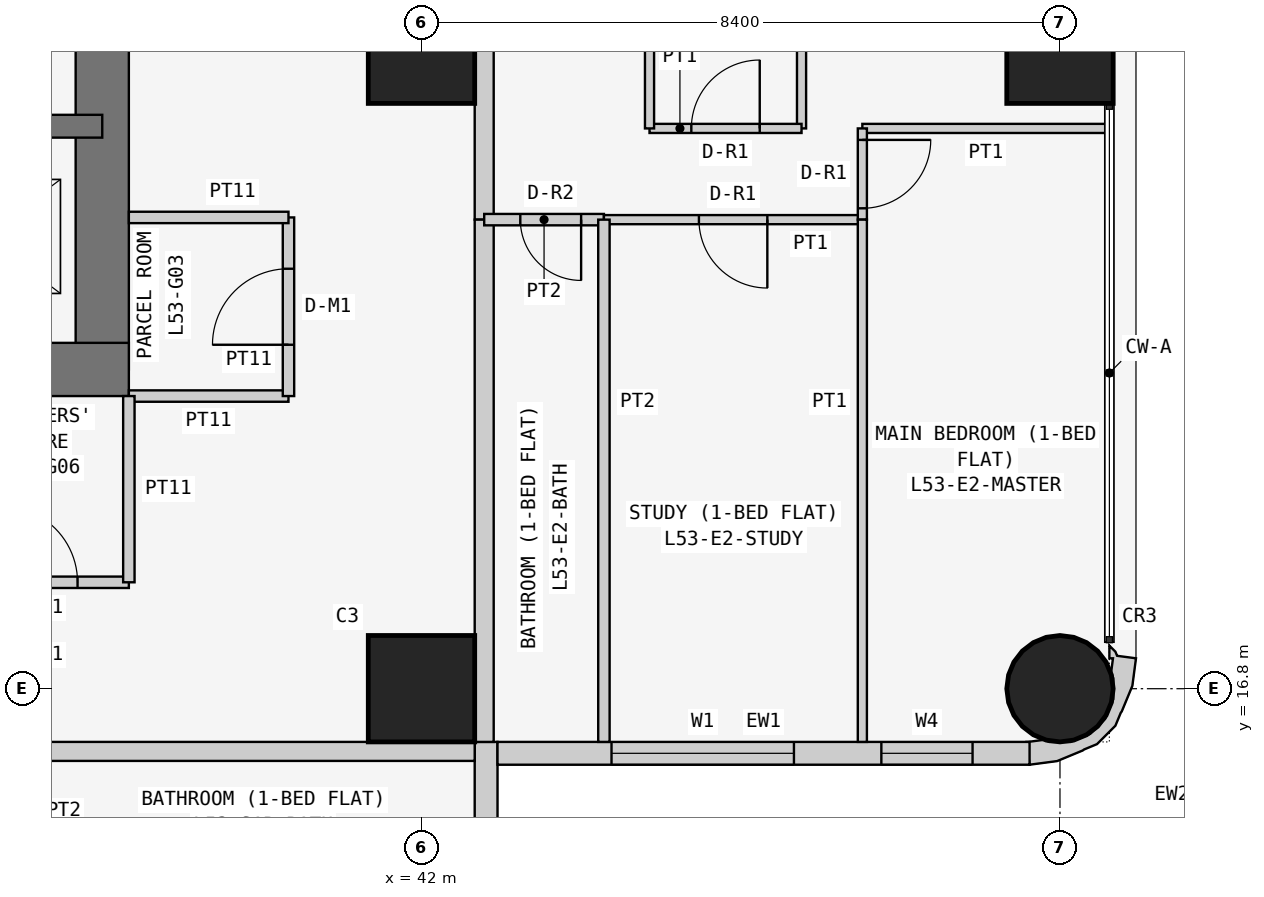
"""IFC4 building model, lengths in metres.
Left out: names, types, materials, properties, quantities, classifications, styles, units other than length and angle.
Written with IfcOpenShell. Run it as: python <this file> out.ifc"""

import sys

from ifc_helpers import new_model, si_unit, direction, frame, frame_2d, origin, origin_2d, place, context, subcontext, project, spatial, polyline, rectangle, circle, outline, extrude, element, fill, save


model = new_model("IFC4")
c1 = context("Model", 3, precision=1e-05, world=origin(), true_north=direction((0.0, 1.0)))
c2 = subcontext(c1, "Body", "Model", "MODEL_VIEW")
j1 = project(units=[si_unit("LENGTHUNIT", "METRE"), si_unit("PLANEANGLEUNIT", "RADIAN")], contexts=[c1])
p1 = place(None, origin())
s1 = spatial("IfcSite", under=j1, at=p1, CompositionType="ELEMENT")
p2 = place(p1, origin())
s2 = spatial("IfcBuilding", under=s1, at=p2, CompositionType="ELEMENT")
p3 = place(p2, frame((0.0, 0.0, 204.9)))
s3 = spatial("IfcBuildingStorey", under=s2, at=p3, CompositionType="ELEMENT", Elevation=204.9)
for number, where, z_axis, x_axis in (
    (1, (42.0, 16.8, 0.0), (0.0, 0.0, 1.0), (1.0, 0.0, 0.0)),
    (2, (42.0, 25.2, 0.0), (0.0, 0.0, 1.0), (1.0, 0.0, 0.0)),
):
    element("IfcColumn", number, at=place(p3, frame(where, z_axis=z_axis, x_axis=x_axis)), inside=s3, PredefinedType="COLUMN", context=c2, shape_type="SweptSolid", body=[
        extrude(rectangle(XDim=1.4, YDim=1.4, at=origin_2d()), origin(), (0.0, 0.0, 1.0), 3.6),
    ])
p4 = place(p3, frame((50.4, 16.8, 0.0), z_axis=(0.0, 0.0, 1.0), x_axis=(1.0, 0.0, 0.0)))
e3 = element("IfcColumn", 3, at=p4, inside=s3, PredefinedType="COLUMN", context=c2, shape_type="SweptSolid", body=[
    extrude(circle(Radius=0.7, at=origin_2d()), origin(), (0.0, 0.0, 1.0), 3.6),
])
p5 = place(p3, frame((50.4, 25.2, 0.0), z_axis=(0.0, 0.0, 1.0), x_axis=(1.0, 0.0, 0.0)))
e4 = element("IfcColumn", 4, at=p5, inside=s3, PredefinedType="COLUMN", context=c2, shape_type="SweptSolid", body=[
    extrude(rectangle(XDim=1.4, YDim=1.4, at=origin_2d()), origin(), (0.0, 0.0, 1.0), 3.6),
])
p6 = place(p3, frame((21.0, 21.0, 0.0), z_axis=(0.0, 0.0, 1.0), x_axis=(1.0, 0.0, 0.0)))
e5 = element("IfcWall", 5, at=p6, inside=s3, PredefinedType="SHEAR", context=c2, shape_type="SweptSolid", body=[
    extrude(rectangle(XDim=17.15, YDim=0.7, at=frame_2d((8.575, 0.0))), origin(), (0.0, 0.0, 1.0), 3.6),
])
p7 = place(p3, frame((37.8, 21.0, 0.0), z_axis=(0.0, 0.0, 1.0), x_axis=(0.0, 1.0, 0.0)))
e6 = element("IfcWall", 6, at=p7, inside=s3, PredefinedType="SHEAR", context=c2, shape_type="SweptSolid", body=[
    extrude(rectangle(XDim=17.15, YDim=0.7, at=frame_2d((8.575, 0.0))), origin(), (0.0, 0.0, 1.0), 3.6),
])
p8 = place(p7, frame((5.2, 0.0, 0.0)))
e7 = element("IfcOpeningElement", 7, at=p8, cuts=e6, PredefinedType="OPENING", context=c2, shape_type="SweptSolid", body=[
    extrude(rectangle(XDim=1.2, YDim=2.1, at=frame_2d((0.6, 1.05))), frame((0.0, 0.36, 0.0), z_axis=(0.0, -1.0, 0.0), x_axis=(1.0, 0.0, 0.0)), (0.0, 0.0, 1.0), 0.72),
])
p9 = place(p3, frame((26.6, 24.2, 0.0), z_axis=(0.0, 0.0, 1.0), x_axis=(1.0, 0.0, 0.0)))
e8 = element("IfcWall", 8, at=p9, inside=s3, PredefinedType="SHEAR", context=c2, shape_type="SweptSolid", body=[
    extrude(rectangle(XDim=11.2, YDim=0.3, at=frame_2d((5.6, 0.0))), origin(), (0.0, 0.0, 1.0), 3.6),
])
p10 = place(p9, frame((0.913, 0.0, 0.0)))
e9 = element("IfcOpeningElement", 9, at=p10, cuts=e8, PredefinedType="OPENING", context=c2, shape_type="SweptSolid", body=[
    extrude(rectangle(XDim=1.0, YDim=2.1, at=frame_2d((0.5, 1.05))), frame((0.0, 0.16, 0.0), z_axis=(0.0, -1.0, 0.0), x_axis=(1.0, 0.0, 0.0)), (0.0, 0.0, 1.0), 0.32),
])
p11 = place(p9, frame((3.75, 0.0, 0.0)))
e10 = element("IfcOpeningElement", 10, at=p11, cuts=e8, PredefinedType="OPENING", context=c2, shape_type="SweptSolid", body=[
    extrude(rectangle(XDim=0.9, YDim=2.1, at=frame_2d((0.45, 1.05))), frame((0.0, 0.16, 0.0), z_axis=(0.0, -1.0, 0.0), x_axis=(1.0, 0.0, 0.0)), (0.0, 0.0, 1.0), 0.32),
])
p12 = place(p9, frame((6.45, 0.0, 0.0)))
e11 = element("IfcOpeningElement", 11, at=p12, cuts=e8, PredefinedType="OPENING", context=c2, shape_type="SweptSolid", body=[
    extrude(rectangle(XDim=1.1, YDim=2.1, at=frame_2d((0.55, 1.05))), frame((0.0, 0.16, 0.0), z_axis=(0.0, -1.0, 0.0), x_axis=(1.0, 0.0, 0.0)), (0.0, 0.0, 1.0), 0.32),
])
p13 = place(p9, frame((9.1, 0.0, 0.0)))
e12 = element("IfcOpeningElement", 12, at=p13, cuts=e8, PredefinedType="OPENING", context=c2, shape_type="SweptSolid", body=[
    extrude(rectangle(XDim=1.1, YDim=2.1, at=frame_2d((0.55, 1.05))), frame((0.0, 0.16, 0.0), z_axis=(0.0, -1.0, 0.0), x_axis=(1.0, 0.0, 0.0)), (0.0, 0.0, 1.0), 0.32),
])
p14 = place(p3, frame((42.85, 8.8, 0.0), z_axis=(0.0, 0.0, 1.0), x_axis=(0.0, 1.0, 0.0)))
e13 = element("IfcWall", 13, at=p14, inside=s3, PredefinedType="SOLIDWALL", context=c2, shape_type="SweptSolid", body=[
    extrude(rectangle(XDim=7.3, YDim=0.3, at=frame_2d((3.65, 0.0))), origin(), (0.0, 0.0, 1.0), 3.45),
])
p15 = place(p14, frame((3.1, 0.0, 0.9)))
e14 = element("IfcOpeningElement", 14, at=p15, cuts=e13, PredefinedType="OPENING", context=c2, shape_type="SweptSolid", body=[
    extrude(rectangle(XDim=2.4, YDim=1.5, at=frame_2d((1.2, 0.75))), frame((0.0, 0.16, 0.0), z_axis=(0.0, -1.0, 0.0), x_axis=(1.0, 0.0, 0.0)), (0.0, 0.0, 1.0), 0.32),
])
p16 = place(p14, frame((0.75, 0.0, 0.9)))
e15 = element("IfcOpeningElement", 15, at=p16, cuts=e13, PredefinedType="OPENING", context=c2, shape_type="SweptSolid", body=[
    extrude(rectangle(XDim=1.2, YDim=1.5, at=frame_2d((0.6, 0.75))), frame((0.0, 0.16, 0.0), z_axis=(0.0, -1.0, 0.0), x_axis=(1.0, 0.0, 0.0)), (0.0, 0.0, 1.0), 0.32),
])
p17 = place(p3, frame((43.0, 15.95, 0.0), z_axis=(0.0, 0.0, 1.0), x_axis=(1.0, 0.0, 0.0)))
e16 = element("IfcWall", 16, at=p17, inside=s3, PredefinedType="SOLIDWALL", context=c2, shape_type="SweptSolid", body=[
    extrude(rectangle(XDim=7.0, YDim=0.3, at=frame_2d((3.5, 0.0))), origin(), (0.0, 0.0, 1.0), 3.45),
])
p18 = place(p17, frame((1.5, 0.0, 0.9)))
e17 = element("IfcOpeningElement", 17, at=p18, cuts=e16, PredefinedType="OPENING", context=c2, shape_type="SweptSolid", body=[
    extrude(rectangle(XDim=2.4, YDim=1.5, at=frame_2d((1.2, 0.75))), frame((0.0, 0.16, 0.0), z_axis=(0.0, -1.0, 0.0), x_axis=(1.0, 0.0, 0.0)), (0.0, 0.0, 1.0), 0.32),
])
p19 = place(p17, frame((5.05, 0.0, 0.9)))
e18 = element("IfcOpeningElement", 18, at=p19, cuts=e16, PredefinedType="OPENING", context=c2, shape_type="SweptSolid", body=[
    extrude(rectangle(XDim=1.2, YDim=1.5, at=frame_2d((0.6, 0.75))), frame((0.0, 0.16, 0.0), z_axis=(0.0, -1.0, 0.0), x_axis=(1.0, 0.0, 0.0)), (0.0, 0.0, 1.0), 0.32),
])
p20 = place(p3, frame((50.11, 16.076, 0.0), z_axis=(0.0, 0.0, 1.0), x_axis=(0.898030234854, -0.439933741929, 0.0)))
e19 = element("IfcWall", 19, at=p20, inside=s3, PredefinedType="SOLIDWALL", context=c2, shape_type="SweptSolid", body=[
    extrude(outline(polyline([(0.664, 1.577), (0.426, 1.497), (0.382, 1.536), (0.276, 1.572), (0.349, 1.423), (0.392, 1.444), (0.453, 1.261), (0.51, 1.211), (0.632, 0.961), (0.65, 0.683), (0.56, 0.419), (0.375, 0.21), (0.125, 0.087), (0.05, 0.082), (-0.128, -0.035), (-0.145, -0.044), (0.022, -0.296), (0.327, -0.094), (0.568, 0.18), (0.577, 0.199), (0.7, 0.337), (0.811, 0.661), (0.799, 0.846), (0.803, 0.866), (0.78, 1.231), (0.664, 1.577)])), origin(), (0.0, 0.0, 1.0), 3.45),
])
p21 = place(p3, frame((38.15, 20.65, 0.0), z_axis=(0.0, 0.0, 1.0), x_axis=(1.0, 0.0, 0.0)))
e20 = element("IfcWall", 20, at=p21, inside=s3, PredefinedType="PARTITIONING", context=c2, shape_type="SweptSolid", body=[
    extrude(rectangle(XDim=2.1, YDim=0.15, at=frame_2d((1.05, 0.0))), origin(), (0.0, 0.0, 1.0), 3.45),
])
p22 = place(p3, frame((40.25, 20.65, 0.0), z_axis=(0.0, 0.0, 1.0), x_axis=(0.0, 1.0, 0.0)))
e21 = element("IfcWall", 21, at=p22, inside=s3, PredefinedType="PARTITIONING", context=c2, shape_type="SweptSolid", body=[
    extrude(rectangle(XDim=2.35, YDim=0.15, at=frame_2d((1.175, 0.0))), origin(), (0.0, 0.0, 1.0), 3.45),
])
p23 = place(p22, frame((0.675, 0.0, 0.0)))
e22 = element("IfcOpeningElement", 22, at=p23, cuts=e21, PredefinedType="OPENING", context=c2, shape_type="SweptSolid", body=[
    extrude(rectangle(XDim=1.0, YDim=2.1, at=frame_2d((0.5, 1.05))), frame((0.0, 0.085, 0.0), z_axis=(0.0, -1.0, 0.0), x_axis=(1.0, 0.0, 0.0)), (0.0, 0.0, 1.0), 0.17),
])
p24 = place(p3, frame((40.25, 23.0, 0.0), z_axis=(0.0, 0.0, 1.0), x_axis=(-1.0, 0.0, 0.0)))
e23 = element("IfcWall", 23, at=p24, inside=s3, PredefinedType="PARTITIONING", context=c2, shape_type="SweptSolid", body=[
    extrude(rectangle(XDim=2.1, YDim=0.15, at=frame_2d((1.05, 0.0))), origin(), (0.0, 0.0, 1.0), 3.45),
])
p25 = place(p3, frame((35.8, 18.2, 0.0), z_axis=(0.0, 0.0, 1.0), x_axis=(1.0, 0.0, 0.0)))
e24 = element("IfcWall", 24, at=p25, inside=s3, PredefinedType="PARTITIONING", context=c2, shape_type="SweptSolid", body=[
    extrude(rectangle(XDim=2.35, YDim=0.15, at=frame_2d((1.175, 0.0))), origin(), (0.0, 0.0, 1.0), 3.45),
])
p26 = place(p25, frame((0.675, 0.0, 0.0)))
e25 = element("IfcOpeningElement", 25, at=p26, cuts=e24, PredefinedType="OPENING", context=c2, shape_type="SweptSolid", body=[
    extrude(rectangle(XDim=1.0, YDim=2.1, at=frame_2d((0.5, 1.05))), frame((0.0, 0.085, 0.0), z_axis=(0.0, -1.0, 0.0), x_axis=(1.0, 0.0, 0.0)), (0.0, 0.0, 1.0), 0.17),
])
p27 = place(p3, frame((38.15, 18.2, 0.0), z_axis=(0.0, 0.0, 1.0), x_axis=(0.0, 1.0, 0.0)))
e26 = element("IfcWall", 26, at=p27, inside=s3, PredefinedType="PARTITIONING", context=c2, shape_type="SweptSolid", body=[
    extrude(rectangle(XDim=2.45, YDim=0.15, at=frame_2d((1.225, 0.0))), origin(), (0.0, 0.0, 1.0), 3.45),
])
p28 = place(p3, frame((42.825, 29.4, 0.0), z_axis=(0.0, 0.0, 1.0), x_axis=(0.0, -1.0, 0.0)))
e27 = element("IfcWall", 27, at=p28, inside=s3, PredefinedType="PARTITIONING", context=c2, shape_type="SweptSolid", body=[
    extrude(rectangle(XDim=6.429, YDim=0.25, at=frame_2d((3.214, 0.0))), origin(), (0.0, 0.0, 1.0), 3.45),
])
p29 = place(p28, frame((0.5, 0.0, 0.0)))
e28 = element("IfcOpeningElement", 28, at=p29, cuts=e27, PredefinedType="OPENING", context=c2, shape_type="SweptSolid", body=[
    extrude(rectangle(XDim=1.0, YDim=2.1, at=frame_2d((0.5, 1.05))), frame((0.0, 0.135, 0.0), z_axis=(0.0, -1.0, 0.0), x_axis=(1.0, 0.0, 0.0)), (0.0, 0.0, 1.0), 0.27),
])
p30 = place(p3, frame((42.825, 22.971, 0.0), z_axis=(0.0, 0.0, 1.0), x_axis=(0.0, -1.0, 0.0)))
e29 = element("IfcWall", 29, at=p30, inside=s3, PredefinedType="PARTITIONING", context=c2, shape_type="SweptSolid", body=[
    extrude(rectangle(XDim=6.871, YDim=0.25, at=frame_2d((3.436, 0.0))), origin(), (0.0, 0.0, 1.0), 3.45),
])
p31 = place(p3, frame((42.7, 15.975, 0.0), z_axis=(0.0, 0.0, 1.0), x_axis=(-1.0, 0.0, 0.0)))
e30 = element("IfcWall", 30, at=p31, inside=s3, PredefinedType="PARTITIONING", context=c2, shape_type="SweptSolid", body=[
    extrude(rectangle(XDim=6.471, YDim=0.25, at=frame_2d((3.235, 0.0))), origin(), (0.0, 0.0, 1.0), 3.45),
])
p32 = place(p3, frame((47.0, 29.4, 0.0), z_axis=(0.0, 0.0, 1.0), x_axis=(0.0, -1.0, 0.0)))
e31 = element("IfcWall", 31, at=p32, inside=s3, PredefinedType="PARTITIONING", context=c2, shape_type="SweptSolid", body=[
    extrude(rectangle(XDim=5.229, YDim=0.12, at=frame_2d((2.615, 0.0))), origin(), (0.0, 0.0, 1.0), 3.45),
])
p33 = place(p3, frame((47.0, 24.171, 0.0), z_axis=(0.0, 0.0, 1.0), x_axis=(-1.0, 0.0, 0.0)))
e32 = element("IfcWall", 32, at=p33, inside=s3, PredefinedType="PARTITIONING", context=c2, shape_type="SweptSolid", body=[
    extrude(rectangle(XDim=2.0, YDim=0.12, at=frame_2d((1.0, 0.0))), origin(), (0.0, 0.0, 1.0), 3.45),
])
p34 = place(p33, frame((0.55, 0.0, 0.0)))
e33 = element("IfcOpeningElement", 33, at=p34, cuts=e32, PredefinedType="OPENING", context=c2, shape_type="SweptSolid", body=[
    extrude(rectangle(XDim=0.9, YDim=2.1, at=frame_2d((0.45, 1.05))), frame((0.0, 0.07, 0.0), z_axis=(0.0, -1.0, 0.0), x_axis=(1.0, 0.0, 0.0)), (0.0, 0.0, 1.0), 0.14),
])
p35 = place(p3, frame((45.0, 24.171, 0.0), z_axis=(0.0, 0.0, 1.0), x_axis=(0.0, 1.0, 0.0)))
e34 = element("IfcWall", 34, at=p35, inside=s3, PredefinedType="PARTITIONING", context=c2, shape_type="SweptSolid", body=[
    extrude(rectangle(XDim=5.229, YDim=0.12, at=frame_2d((2.615, 0.0))), origin(), (0.0, 0.0, 1.0), 3.45),
])
p36 = place(p3, frame((44.4, 22.971, 0.0), z_axis=(0.0, 0.0, 1.0), x_axis=(-1.0, 0.0, 0.0)))
e35 = element("IfcWall", 35, at=p36, inside=s3, PredefinedType="PARTITIONING", context=c2, shape_type="SweptSolid", body=[
    extrude(rectangle(XDim=1.575, YDim=0.15, at=frame_2d((0.788, 0.0))), origin(), (0.0, 0.0, 1.0), 3.45),
])
p37 = place(p36, frame((0.3, 0.0, 0.0)))
e36 = element("IfcOpeningElement", 36, at=p37, cuts=e35, PredefinedType="OPENING", context=c2, shape_type="SweptSolid", body=[
    extrude(rectangle(XDim=0.8, YDim=2.1, at=frame_2d((0.4, 1.05))), frame((0.0, 0.085, 0.0), z_axis=(0.0, -1.0, 0.0), x_axis=(1.0, 0.0, 0.0)), (0.0, 0.0, 1.0), 0.17),
])
p38 = place(p3, frame((47.8, 22.971, 0.0), z_axis=(0.0, 0.0, 1.0), x_axis=(-1.0, 0.0, 0.0)))
e37 = element("IfcWall", 37, at=p38, inside=s3, PredefinedType="PARTITIONING", context=c2, shape_type="SweptSolid", body=[
    extrude(rectangle(XDim=3.4, YDim=0.12, at=frame_2d((1.7, 0.0))), origin(), (0.0, 0.0, 1.0), 3.45),
])
p39 = place(p38, frame((1.25, 0.0, 0.0)))
e38 = element("IfcOpeningElement", 38, at=p39, cuts=e37, PredefinedType="OPENING", context=c2, shape_type="SweptSolid", body=[
    extrude(rectangle(XDim=0.9, YDim=2.1, at=frame_2d((0.45, 1.05))), frame((0.0, 0.07, 0.0), z_axis=(0.0, -1.0, 0.0), x_axis=(1.0, 0.0, 0.0)), (0.0, 0.0, 1.0), 0.14),
])
p40 = place(p3, frame((51.05, 24.171, 0.0), z_axis=(0.0, 0.0, 1.0), x_axis=(-1.0, 0.0, 0.0)))
e39 = element("IfcWall", 39, at=p40, inside=s3, PredefinedType="PARTITIONING", context=c2, shape_type="SweptSolid", body=[
    extrude(rectangle(XDim=3.25, YDim=0.12, at=frame_2d((1.625, 0.0))), origin(), (0.0, 0.0, 1.0), 3.45),
])
p41 = place(p3, frame((47.8, 24.171, 0.0), z_axis=(0.0, 0.0, 1.0), x_axis=(0.0, -1.0, 0.0)))
e40 = element("IfcWall", 40, at=p41, inside=s3, PredefinedType="PARTITIONING", context=c2, shape_type="SweptSolid", body=[
    extrude(rectangle(XDim=1.2, YDim=0.12, at=frame_2d((0.6, 0.0))), origin(), (0.0, 0.0, 1.0), 3.45),
])
p42 = place(p41, frame((0.151, 0.0, 0.0)))
e41 = element("IfcOpeningElement", 41, at=p42, cuts=e40, PredefinedType="OPENING", context=c2, shape_type="SweptSolid", body=[
    extrude(rectangle(XDim=0.9, YDim=2.1, at=frame_2d((0.45, 1.05))), frame((0.0, 0.07, 0.0), z_axis=(0.0, -1.0, 0.0), x_axis=(1.0, 0.0, 0.0)), (0.0, 0.0, 1.0), 0.14),
])
p43 = place(p3, frame((44.4, 22.971, 0.0), z_axis=(0.0, 0.0, 1.0), x_axis=(0.0, -1.0, 0.0)))
e42 = element("IfcWall", 42, at=p43, inside=s3, PredefinedType="PARTITIONING", context=c2, shape_type="SweptSolid", body=[
    extrude(rectangle(XDim=6.871, YDim=0.15, at=frame_2d((3.436, 0.0))), origin(), (0.0, 0.0, 1.0), 3.45),
])
p44 = place(p3, frame((47.8, 22.971, 0.0), z_axis=(0.0, 0.0, 1.0), x_axis=(0.0, -1.0, 0.0)))
e43 = element("IfcWall", 43, at=p44, inside=s3, PredefinedType="PARTITIONING", context=c2, shape_type="SweptSolid", body=[
    extrude(rectangle(XDim=6.871, YDim=0.12, at=frame_2d((3.436, 0.0))), origin(), (0.0, 0.0, 1.0), 3.45),
])
p45 = place(p18, origin())
e44 = element("IfcWindow", 44, at=p45, inside=s3, PartitioningType="SINGLE_PANEL", PredefinedType="WINDOW", context=c2, shape_type="SweptSolid", body=[
    extrude(rectangle(XDim=2.4, YDim=1.5, at=frame_2d((1.2, 0.75))), frame((0.0, 0.03, 0.0), z_axis=(0.0, -1.0, 0.0), x_axis=(1.0, 0.0, 0.0)), (0.0, 0.0, 1.0), 0.06),
])
fill(e17, e44)
p46 = place(p19, origin())
e45 = element("IfcWindow", 45, at=p46, inside=s3, PartitioningType="SINGLE_PANEL", PredefinedType="WINDOW", context=c2, shape_type="SweptSolid", body=[
    extrude(rectangle(XDim=1.2, YDim=1.5, at=frame_2d((0.6, 0.75))), frame((0.0, 0.03, 0.0), z_axis=(0.0, -1.0, 0.0), x_axis=(1.0, 0.0, 0.0)), (0.0, 0.0, 1.0), 0.06),
])
fill(e18, e45)
p47 = place(p23, origin())
e46 = element("IfcDoor", 46, at=p47, inside=s3, OperationType="SINGLE_SWING_LEFT", PredefinedType="DOOR", context=c2, shape_type="SweptSolid", body=[
    extrude(rectangle(XDim=1.0, YDim=2.1, at=frame_2d((0.5, 1.05))), frame((0.0, 0.025, 0.0), z_axis=(0.0, -1.0, 0.0), x_axis=(1.0, 0.0, 0.0)), (0.0, 0.0, 1.0), 0.05),
])
fill(e22, e46)
p48 = place(p26, origin())
e47 = element("IfcDoor", 47, at=p48, inside=s3, OperationType="SINGLE_SWING_LEFT", PredefinedType="DOOR", context=c2, shape_type="SweptSolid", body=[
    extrude(rectangle(XDim=1.0, YDim=2.1, at=frame_2d((0.5, 1.05))), frame((0.0, 0.025, 0.0), z_axis=(0.0, -1.0, 0.0), x_axis=(1.0, 0.0, 0.0)), (0.0, 0.0, 1.0), 0.05),
])
fill(e25, e47)
p49 = place(p34, frame((0.9, 0.0, 0.0), z_axis=(0.0, 0.0, 1.0), x_axis=(-1.0, 0.0, 0.0)))
e48 = element("IfcDoor", 48, at=p49, inside=s3, OperationType="SINGLE_SWING_RIGHT", PredefinedType="DOOR", context=c2, shape_type="SweptSolid", body=[
    extrude(rectangle(XDim=0.9, YDim=2.1, at=frame_2d((0.45, 1.05))), frame((0.0, 0.025, 0.0), z_axis=(0.0, -1.0, 0.0), x_axis=(1.0, 0.0, 0.0)), (0.0, 0.0, 1.0), 0.05),
])
fill(e33, e48)
p50 = place(p37, origin())
e49 = element("IfcDoor", 49, at=p50, inside=s3, OperationType="SINGLE_SWING_LEFT", PredefinedType="DOOR", context=c2, shape_type="SweptSolid", body=[
    extrude(rectangle(XDim=0.8, YDim=2.1, at=frame_2d((0.4, 1.05))), frame((0.0, 0.025, 0.0), z_axis=(0.0, -1.0, 0.0), x_axis=(1.0, 0.0, 0.0)), (0.0, 0.0, 1.0), 0.05),
])
fill(e36, e49)
p51 = place(p39, origin())
e50 = element("IfcDoor", 50, at=p51, inside=s3, OperationType="SINGLE_SWING_LEFT", PredefinedType="DOOR", context=c2, shape_type="SweptSolid", body=[
    extrude(rectangle(XDim=0.9, YDim=2.1, at=frame_2d((0.45, 1.05))), frame((0.0, 0.025, 0.0), z_axis=(0.0, -1.0, 0.0), x_axis=(1.0, 0.0, 0.0)), (0.0, 0.0, 1.0), 0.05),
])
fill(e38, e50)
p52 = place(p42, origin())
e51 = element("IfcDoor", 51, at=p52, inside=s3, OperationType="SINGLE_SWING_LEFT", PredefinedType="DOOR", context=c2, shape_type="SweptSolid", body=[
    extrude(rectangle(XDim=0.9, YDim=2.1, at=frame_2d((0.45, 1.05))), frame((0.0, 0.025, 0.0), z_axis=(0.0, -1.0, 0.0), x_axis=(1.0, 0.0, 0.0)), (0.0, 0.0, 1.0), 0.05),
])
fill(e41, e51)
save(model, sys.argv[1])
